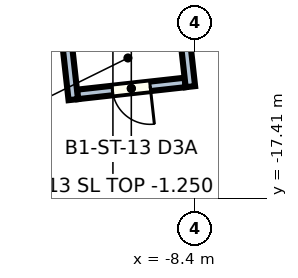
"""IFC4 building model, lengths in metres.
Left out: names, types, materials, properties, quantities, classifications, styles, units other than length and angle.
Written with IfcOpenShell. Run it as: python <this file> out.ifc"""

import sys

from ifc_helpers import new_model, si_unit, direction, frame, frame_2d, origin, place, context, subcontext, project, spatial, rectangle, extrude, element, fill, save


model = new_model("IFC4")
c1 = context("Model", 3, precision=1e-05, world=origin(), true_north=direction((0.0, 1.0)))
c2 = subcontext(c1, "Body", "Model", "MODEL_VIEW")
j1 = project(units=[si_unit("LENGTHUNIT", "METRE"), si_unit("PLANEANGLEUNIT", "RADIAN")], contexts=[c1])
p1 = place(None, origin())
s1 = spatial("IfcSite", under=j1, at=p1, CompositionType="ELEMENT")
p2 = place(p1, origin())
s2 = spatial("IfcBuilding", under=s1, at=p2, CompositionType="ELEMENT")
p3 = place(p2, frame((0.0, 0.0, -5.0)))
s3 = spatial("IfcBuildingStorey", under=s2, at=p3, CompositionType="ELEMENT", Elevation=-5.0)
p4 = place(p3, frame((-8.667, -14.3, 0.0), z_axis=(0.0, 0.0, 1.0), x_axis=(-0.993904609394, -0.110243491536, 0.0)))
e1 = element("IfcWall", 1, at=p4, inside=s3, PredefinedType="SOLIDWALL", context=c2, shape_type="SweptSolid", body=[
    extrude(rectangle(XDim=2.85, YDim=0.25, at=frame_2d((1.425, 0.0))), origin(), (0.0, 0.0, 1.0), 4.6),
])
p5 = place(p4, frame((0.925, 0.0, 0.0)))
e2 = element("IfcOpeningElement", 2, at=p5, cuts=e1, PredefinedType="OPENING", context=c2, shape_type="SweptSolid", body=[
    extrude(rectangle(XDim=1.0, YDim=2.1, at=frame_2d((0.5, 1.05))), frame((0.0, 0.135, 0.0), z_axis=(0.0, -1.0, 0.0), x_axis=(1.0, 0.0, 0.0)), (0.0, 0.0, 1.0), 0.27),
])
p6 = place(p3, frame((-11.61, -14.753, 0.0), z_axis=(0.0, 0.0, 1.0), x_axis=(-0.110310943534, 0.993897125329, 0.0)))
e3 = element("IfcWall", 3, at=p6, inside=s3, PredefinedType="SOLIDWALL", context=c2, shape_type="SweptSolid", body=[
    extrude(rectangle(XDim=6.0, YDim=0.25, at=frame_2d((3.0, 0.0))), origin(), (0.0, 0.0, 1.0), 4.6),
])
p7 = place(p3, frame((-9.22, -8.178, 0.0), z_axis=(0.0, 0.0, 1.0), x_axis=(0.110299055694, -0.993898444668, 0.0)))
e4 = element("IfcWall", 4, at=p7, inside=s3, PredefinedType="SOLIDWALL", context=c2, shape_type="SweptSolid", body=[
    extrude(rectangle(XDim=6.271, YDim=0.25, at=frame_2d((3.135, 0.0))), origin(), (0.0, 0.0, 1.0), 4.6),
])
p8 = place(p5, origin())
e5 = element("IfcDoor", 5, at=p8, inside=s3, PredefinedType="DOOR", context=c2, shape_type="SweptSolid", body=[
    extrude(rectangle(XDim=1.0, YDim=2.1, at=frame_2d((0.5, 1.05))), frame((0.0, 0.025, 0.0), z_axis=(0.0, -1.0, 0.0), x_axis=(1.0, 0.0, 0.0)), (0.0, 0.0, 1.0), 0.05),
])
fill(e2, e5)
save(model, sys.argv[1])
